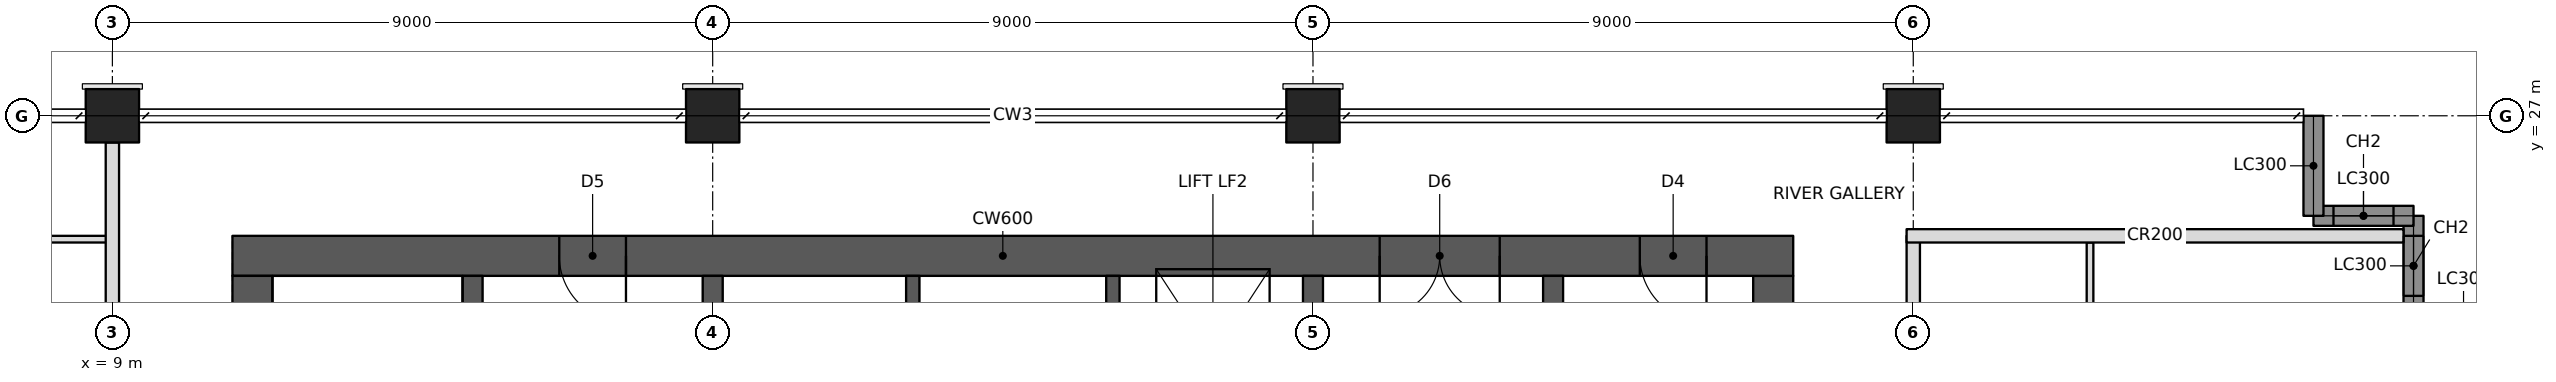
"""IFC4 building model, lengths in metres.
Left out: names, types, materials, properties, quantities, classifications, styles, units other than length and angle.
Written with IfcOpenShell. Run it as: python <this file> out.ifc"""

import sys

from ifc_helpers import new_model, si_unit, direction, frame, frame_2d, origin, origin_2d, place, context, subcontext, project, spatial, rectangle, hollow_rectangle, extrude, element, fill, save


model = new_model("IFC4")
c1 = context("Model", 3, precision=1e-05, world=origin(), true_north=direction((0.0, 1.0)))
c2 = subcontext(c1, "Body", "Model", "MODEL_VIEW")
j1 = project(units=[si_unit("LENGTHUNIT", "METRE"), si_unit("PLANEANGLEUNIT", "RADIAN")], contexts=[c1])
p1 = place(None, origin())
s1 = spatial("IfcSite", under=j1, at=p1, CompositionType="ELEMENT")
p2 = place(p1, origin())
s2 = spatial("IfcBuilding", under=s1, at=p2, CompositionType="ELEMENT")
p3 = place(p2, frame((0.0, 0.0, 211.4)))
s3 = spatial("IfcBuildingStorey", under=s2, at=p3, CompositionType="ELEMENT", Elevation=211.4)
for number, where, z_axis, x_axis in (
    (1, (9.0, 27.0, 0.0), (0.0, 0.0, 1.0), (1.0, 0.0, 0.0)),
    (2, (18.0, 27.0, 0.0), (0.0, 0.0, 1.0), (1.0, 0.0, 0.0)),
    (3, (27.0, 27.0, 0.0), (0.0, 0.0, 1.0), (1.0, 0.0, 0.0)),
    (4, (36.0, 27.0, 0.0), (0.0, 0.0, 1.0), (1.0, 0.0, 0.0)),
):
    element("IfcColumn", number, at=place(p3, frame(where, z_axis=z_axis, x_axis=x_axis)), inside=s3, PredefinedType="COLUMN", context=c2, shape_type="SweptSolid", body=[
        extrude(hollow_rectangle(XDim=0.8, YDim=0.8, WallThickness=0.06, at=origin_2d()), origin(), (0.0, 0.0, 1.0), 3.4),
    ])
p4 = place(p3, frame((10.8, 24.9, 0.0), z_axis=(0.0, 0.0, 1.0), x_axis=(1.0, 0.0, 0.0)))
e5 = element("IfcWall", 5, at=p4, inside=s3, PredefinedType="SHEAR", context=c2, shape_type="SweptSolid", body=[
    extrude(rectangle(XDim=23.4, YDim=0.6, at=frame_2d((11.7, 0.0))), origin(), (0.0, 0.0, 1.0), 3.4),
])
p5 = place(p4, frame((17.2, 0.0, 0.0)))
e6 = element("IfcOpeningElement", 6, at=p5, cuts=e5, PredefinedType="OPENING", context=c2, shape_type="SweptSolid", body=[
    extrude(rectangle(XDim=1.8, YDim=2.1, at=frame_2d((0.9, 1.05))), frame((0.0, 0.31, 0.0), z_axis=(0.0, -1.0, 0.0), x_axis=(1.0, 0.0, 0.0)), (0.0, 0.0, 1.0), 0.62),
])
p6 = place(p4, frame((21.1, 0.0, 0.0)))
e7 = element("IfcOpeningElement", 7, at=p6, cuts=e5, PredefinedType="OPENING", context=c2, shape_type="SweptSolid", body=[
    extrude(rectangle(XDim=1.0, YDim=2.1, at=frame_2d((0.5, 1.05))), frame((0.0, 0.31, 0.0), z_axis=(0.0, -1.0, 0.0), x_axis=(1.0, 0.0, 0.0)), (0.0, 0.0, 1.0), 0.62),
])
p7 = place(p4, frame((4.9, 0.0, 0.0)))
e8 = element("IfcOpeningElement", 8, at=p7, cuts=e5, PredefinedType="OPENING", context=c2, shape_type="SweptSolid", body=[
    extrude(rectangle(XDim=1.0, YDim=2.1, at=frame_2d((0.5, 1.05))), frame((0.0, 0.31, 0.0), z_axis=(0.0, -1.0, 0.0), x_axis=(1.0, 0.0, 0.0)), (0.0, 0.0, 1.0), 0.62),
])
for number, where, z_axis, x_axis in (
    (9, (11.1, 11.4, 0.0), (0.0, 0.0, 1.0), (0.0, 1.0, 0.0)),
    (10, (33.9, 11.4, 0.0), (0.0, 0.0, 1.0), (0.0, 1.0, 0.0)),
):
    element("IfcWall", number, at=place(p3, frame(where, z_axis=z_axis, x_axis=x_axis)), inside=s3, PredefinedType="SHEAR", context=c2, shape_type="SweptSolid", body=[
        extrude(rectangle(XDim=13.2, YDim=0.6, at=frame_2d((6.6, 0.0))), origin(), (0.0, 0.0, 1.0), 3.4),
    ])
p8 = place(p3, frame((14.4, 11.4, 0.0), z_axis=(0.0, 0.0, 1.0), x_axis=(0.0, 1.0, 0.0)))
e11 = element("IfcWall", 11, at=p8, inside=s3, PredefinedType="SHEAR", context=c2, shape_type="SweptSolid", body=[
    extrude(rectangle(XDim=13.2, YDim=0.3, at=frame_2d((6.6, 0.0))), origin(), (0.0, 0.0, 1.0), 3.4),
])
p9 = place(p3, frame((18.0, 11.4, 0.0), z_axis=(0.0, 0.0, 1.0), x_axis=(0.0, 1.0, 0.0)))
e12 = element("IfcWall", 12, at=p9, inside=s3, PredefinedType="SHEAR", context=c2, shape_type="SweptSolid", body=[
    extrude(rectangle(XDim=13.2, YDim=0.3, at=frame_2d((6.6, 0.0))), origin(), (0.0, 0.0, 1.0), 3.4),
])
p10 = place(p9, frame((3.6, 0.0, 0.0)))
e13 = element("IfcOpeningElement", 13, at=p10, cuts=e12, PredefinedType="OPENING", context=c2, shape_type="SweptSolid", body=[
    extrude(rectangle(XDim=1.0, YDim=2.1, at=frame_2d((0.5, 1.05))), frame((0.0, 0.16, 0.0), z_axis=(0.0, -1.0, 0.0), x_axis=(1.0, 0.0, 0.0)), (0.0, 0.0, 1.0), 0.32),
])
p11 = place(p9, frame((7.85, 0.0, 0.0)))
e14 = element("IfcOpeningElement", 14, at=p11, cuts=e12, PredefinedType="OPENING", context=c2, shape_type="SweptSolid", body=[
    extrude(rectangle(XDim=1.1, YDim=2.1, at=frame_2d((0.55, 1.05))), frame((0.0, 0.16, 0.0), z_axis=(0.0, -1.0, 0.0), x_axis=(1.0, 0.0, 0.0)), (0.0, 0.0, 1.0), 0.32),
])
p12 = place(p3, frame((27.0, 21.75, 0.0), z_axis=(0.0, 0.0, 1.0), x_axis=(0.0, 1.0, 0.0)))
e15 = element("IfcWall", 15, at=p12, inside=s3, PredefinedType="SHEAR", context=c2, shape_type="SweptSolid", body=[
    extrude(rectangle(XDim=2.85, YDim=0.3, at=frame_2d((1.425, 0.0))), origin(), (0.0, 0.0, 1.0), 3.4),
])
for number, where, z_axis, x_axis in (
    (16, (21.0, 21.75, 0.0), (0.0, 0.0, 1.0), (0.0, 1.0, 0.0)),
    (17, (24.0, 21.75, 0.0), (0.0, 0.0, 1.0), (0.0, 1.0, 0.0)),
):
    element("IfcWall", number, at=place(p3, frame(where, z_axis=z_axis, x_axis=x_axis)), inside=s3, PredefinedType="SHEAR", context=c2, shape_type="SweptSolid", body=[
        extrude(rectangle(XDim=2.85, YDim=0.2, at=frame_2d((1.425, 0.0))), origin(), (0.0, 0.0, 1.0), 3.4),
    ])
p13 = place(p3, frame((30.6, 11.4, 0.0), z_axis=(0.0, 0.0, 1.0), x_axis=(0.0, 1.0, 0.0)))
e18 = element("IfcWall", 18, at=p13, inside=s3, PredefinedType="SHEAR", context=c2, shape_type="SweptSolid", body=[
    extrude(rectangle(XDim=13.2, YDim=0.3, at=frame_2d((6.6, 0.0))), origin(), (0.0, 0.0, 1.0), 3.4),
])
p14 = place(p3, frame((43.5, 24.0, 0.0), z_axis=(0.0, 0.0, 1.0), x_axis=(0.0, 1.0, 0.0)))
e19 = element("IfcWall", 19, at=p14, inside=s3, PredefinedType="SOLIDWALL", context=c2, shape_type="SweptSolid", body=[
    extrude(rectangle(XDim=1.5, YDim=0.3, at=frame_2d((0.75, 0.0))), origin(), (0.0, 0.0, 1.0), 3.2),
])
p15 = place(p14, frame((0.3, 0.0, 0.6)))
e20 = element("IfcOpeningElement", 20, at=p15, cuts=e19, PredefinedType="OPENING", context=c2, shape_type="SweptSolid", body=[
    extrude(rectangle(XDim=0.9, YDim=2.2, at=frame_2d((0.45, 1.1))), frame((0.0, 0.16, 0.0), z_axis=(0.0, -1.0, 0.0), x_axis=(1.0, 0.0, 0.0)), (0.0, 0.0, 1.0), 0.32),
])
p16 = place(p3, frame((43.5, 25.5, 0.0), z_axis=(0.0, 0.0, 1.0), x_axis=(-1.0, 0.0, 0.0)))
e21 = element("IfcWall", 21, at=p16, inside=s3, PredefinedType="SOLIDWALL", context=c2, shape_type="SweptSolid", body=[
    extrude(rectangle(XDim=1.5, YDim=0.3, at=frame_2d((0.75, 0.0))), origin(), (0.0, 0.0, 1.0), 3.2),
])
p17 = place(p16, frame((0.3, 0.0, 0.6)))
e22 = element("IfcOpeningElement", 22, at=p17, cuts=e21, PredefinedType="OPENING", context=c2, shape_type="SweptSolid", body=[
    extrude(rectangle(XDim=0.9, YDim=2.2, at=frame_2d((0.45, 1.1))), frame((0.0, 0.16, 0.0), z_axis=(0.0, -1.0, 0.0), x_axis=(1.0, 0.0, 0.0)), (0.0, 0.0, 1.0), 0.32),
])
p18 = place(p3, frame((42.0, 25.5, 0.0), z_axis=(0.0, 0.0, 1.0), x_axis=(0.0, 1.0, 0.0)))
e23 = element("IfcWall", 23, at=p18, inside=s3, PredefinedType="SOLIDWALL", context=c2, shape_type="SweptSolid", body=[
    extrude(rectangle(XDim=1.5, YDim=0.3, at=frame_2d((0.75, 0.0))), origin(), (0.0, 0.0, 1.0), 2.42),
])
p19 = place(p3, frame((9.0, 18.4, 0.0), z_axis=(0.0, 0.0, 1.0), x_axis=(0.0, 1.0, 0.0)))
e24 = element("IfcWall", 24, at=p19, inside=s3, PredefinedType="PARTITIONING", context=c2, shape_type="SweptSolid", body=[
    extrude(rectangle(XDim=8.2, YDim=0.2, at=frame_2d((4.1, 0.0))), origin(), (0.0, 0.0, 1.0), 2.405),
])
p20 = place(p3, frame((36.0, 18.4, 0.0), z_axis=(0.0, 0.0, 1.0), x_axis=(0.0, 1.0, 0.0)))
e25 = element("IfcWall", 25, at=p20, inside=s3, PredefinedType="PARTITIONING", context=c2, shape_type="SweptSolid", body=[
    extrude(rectangle(XDim=6.8, YDim=0.2, at=frame_2d((3.4, 0.0))), origin(), (0.0, 0.0, 1.0), 2.405),
])
p21 = place(p3, frame((35.9, 25.2, 0.0), z_axis=(0.0, 0.0, 1.0), x_axis=(1.0, 0.0, 0.0)))
e26 = element("IfcWall", 26, at=p21, inside=s3, PredefinedType="PARTITIONING", context=c2, shape_type="SweptSolid", body=[
    extrude(rectangle(XDim=7.45, YDim=0.2, at=frame_2d((3.725, 0.0))), origin(), (0.0, 0.0, 1.0), 2.404),
])
p22 = place(p3, frame((38.65, 21.65, 0.0), z_axis=(0.0, 0.0, 1.0), x_axis=(0.0, 1.0, 0.0)))
e27 = element("IfcWall", 27, at=p22, inside=s3, PredefinedType="PARTITIONING", context=c2, shape_type="SweptSolid", body=[
    extrude(rectangle(XDim=3.45, YDim=0.1, at=frame_2d((1.725, 0.0))), origin(), (0.0, 0.0, 1.0), 3.2),
])
p23 = place(p3, frame((6.35, 25.15, 0.0), z_axis=(0.0, 0.0, 1.0), x_axis=(1.0, 0.0, 0.0)))
e28 = element("IfcWall", 28, at=p23, inside=s3, PredefinedType="PARTITIONING", context=c2, shape_type="SweptSolid", body=[
    extrude(rectangle(XDim=2.6, YDim=0.1, at=frame_2d((1.3, 0.0))), origin(), (0.0, 0.0, 1.0), 2.404),
])
p24 = place(p15, origin())
e29 = element("IfcWindow", 29, at=p24, inside=s3, PartitioningType="SINGLE_PANEL", PredefinedType="WINDOW", context=c2, shape_type="SweptSolid", body=[
    extrude(rectangle(XDim=0.9, YDim=2.2, at=frame_2d((0.45, 1.1))), frame((0.0, 0.03, 0.0), z_axis=(0.0, -1.0, 0.0), x_axis=(1.0, 0.0, 0.0)), (0.0, 0.0, 1.0), 0.06),
])
fill(e20, e29)
p25 = place(p17, origin())
e30 = element("IfcWindow", 30, at=p25, inside=s3, PartitioningType="SINGLE_PANEL", PredefinedType="WINDOW", context=c2, shape_type="SweptSolid", body=[
    extrude(rectangle(XDim=0.9, YDim=2.2, at=frame_2d((0.45, 1.1))), frame((0.0, 0.03, 0.0), z_axis=(0.0, -1.0, 0.0), x_axis=(1.0, 0.0, 0.0)), (0.0, 0.0, 1.0), 0.06),
])
fill(e22, e30)
p26 = place(p5, frame((1.8, 0.0, 0.0), z_axis=(0.0, 0.0, 1.0), x_axis=(-1.0, 0.0, 0.0)))
e31 = element("IfcDoor", 31, at=p26, inside=s3, OperationType="DOUBLE_DOOR_SINGLE_SWING", PredefinedType="DOOR", context=c2, shape_type="SweptSolid", body=[
    extrude(rectangle(XDim=1.8, YDim=2.1, at=frame_2d((0.9, 1.05))), frame((0.0, 0.025, 0.0), z_axis=(0.0, -1.0, 0.0), x_axis=(1.0, 0.0, 0.0)), (0.0, 0.0, 1.0), 0.05),
])
fill(e6, e31)
p27 = place(p6, frame((1.0, 0.0, 0.0), z_axis=(0.0, 0.0, 1.0), x_axis=(-1.0, 0.0, 0.0)))
e32 = element("IfcDoor", 32, at=p27, inside=s3, OperationType="SINGLE_SWING_LEFT", PredefinedType="DOOR", context=c2, shape_type="SweptSolid", body=[
    extrude(rectangle(XDim=1.0, YDim=2.1, at=frame_2d((0.5, 1.05))), frame((0.0, 0.025, 0.0), z_axis=(0.0, -1.0, 0.0), x_axis=(1.0, 0.0, 0.0)), (0.0, 0.0, 1.0), 0.05),
])
fill(e7, e32)
p28 = place(p7, frame((1.0, 0.0, 0.0), z_axis=(0.0, 0.0, 1.0), x_axis=(-1.0, 0.0, 0.0)))
e33 = element("IfcDoor", 33, at=p28, inside=s3, OperationType="SINGLE_SWING_LEFT", PredefinedType="DOOR", context=c2, shape_type="SweptSolid", body=[
    extrude(rectangle(XDim=1.0, YDim=2.1, at=frame_2d((0.5, 1.05))), frame((0.0, 0.025, 0.0), z_axis=(0.0, -1.0, 0.0), x_axis=(1.0, 0.0, 0.0)), (0.0, 0.0, 1.0), 0.05),
])
fill(e8, e33)
save(model, sys.argv[1])
